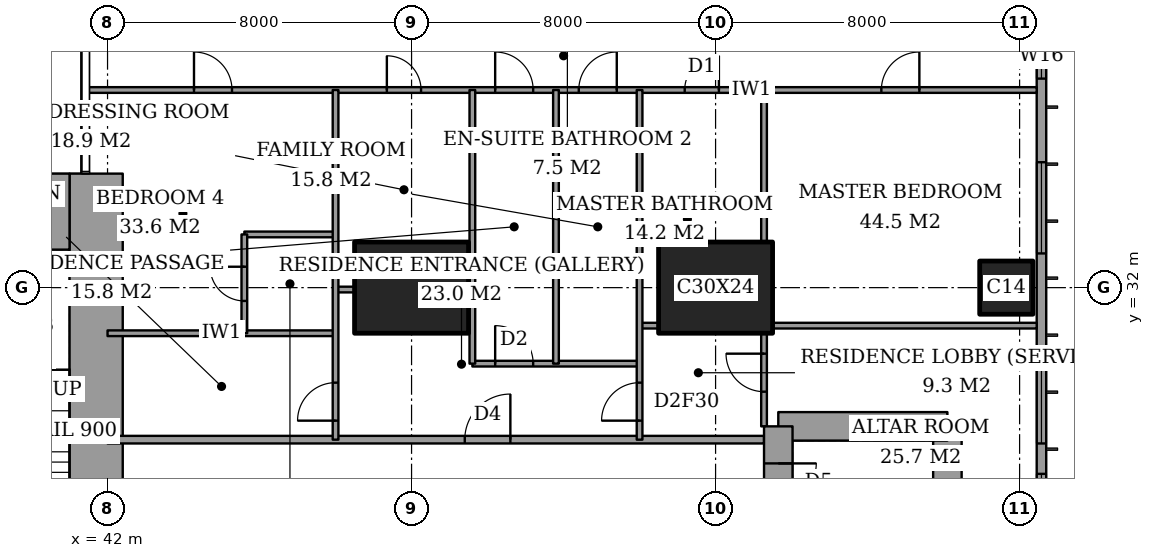
"""IFC4 building model, lengths in metres.
Left out: names, types, materials, properties, quantities, classifications, styles, units other than length and angle.
Written with IfcOpenShell. Run it as: python <this file> out.ifc"""

import sys

from ifc_helpers import new_model, si_unit, direction, frame, frame_2d, origin, origin_2d, place, context, subcontext, project, spatial, rectangle, extrude, element, fill, save


model = new_model("IFC4")
c1 = context("Model", 3, precision=1e-05, world=origin(), true_north=direction((0.0, 1.0)))
c2 = subcontext(c1, "Body", "Model", "MODEL_VIEW")
j1 = project(units=[si_unit("LENGTHUNIT", "METRE"), si_unit("PLANEANGLEUNIT", "RADIAN")], contexts=[c1])
p1 = place(None, origin())
s1 = spatial("IfcSite", under=j1, at=p1, CompositionType="ELEMENT")
p2 = place(p1, origin())
s2 = spatial("IfcBuilding", under=s1, at=p2, CompositionType="ELEMENT")
p3 = place(p2, frame((0.0, 0.0, 282.6)))
s3 = spatial("IfcBuildingStorey", under=s2, at=p3, CompositionType="ELEMENT", Elevation=282.6)
for number, where, z_axis, x_axis in (
    (1, (50.0, 32.0, 0.0), (0.0, 0.0, 1.0), (1.0, 0.0, 0.0)),
    (2, (58.0, 32.0, 0.0), (0.0, 0.0, 1.0), (1.0, 0.0, 0.0)),
):
    element("IfcColumn", number, at=place(p3, frame(where, z_axis=z_axis, x_axis=x_axis)), inside=s3, PredefinedType="COLUMN", context=c2, shape_type="SweptSolid", body=[
        extrude(rectangle(XDim=3.0, YDim=2.4, at=origin_2d()), origin(), (0.0, 0.0, 1.0), 4.5),
    ])
p4 = place(p3, frame((65.65, 32.0, 0.0), z_axis=(0.0, 0.0, 1.0), x_axis=(1.0, 0.0, 0.0)))
e3 = element("IfcColumn", 3, at=p4, inside=s3, PredefinedType="COLUMN", context=c2, shape_type="SweptSolid", body=[
    extrude(rectangle(XDim=1.4, YDim=1.4, at=origin_2d()), origin(), (0.0, 0.0, 1.0), 4.5),
])
p5 = place(p3, frame((37.85, 34.0, 0.0), z_axis=(0.0, 0.0, 1.0), x_axis=(1.0, 0.0, 0.0)))
e4 = element("IfcWall", 4, at=p5, inside=s3, PredefinedType="SHEAR", context=c2, shape_type="SweptSolid", body=[
    extrude(rectangle(XDim=3.15, YDim=2.0, at=frame_2d((1.575, 0.0))), origin(), (0.0, 0.0, 1.0), 4.5),
])
p6 = place(p3, frame((41.7, 24.85, 0.0), z_axis=(0.0, 0.0, 1.0), x_axis=(0.0, 1.0, 0.0)))
e5 = element("IfcWall", 5, at=p6, inside=s3, PredefinedType="SHEAR", context=c2, shape_type="SweptSolid", body=[
    extrude(rectangle(XDim=10.15, YDim=1.4, at=frame_2d((5.075, 0.0))), origin(), (0.0, 0.0, 1.0), 4.5),
])
p7 = place(p3, frame((64.1, 19.65, 0.0), z_axis=(0.0, 0.0, 1.0), x_axis=(0.0, 1.0, 0.0)))
e6 = element("IfcWall", 6, at=p7, inside=s3, PredefinedType="SHEAR", context=c2, shape_type="SweptSolid", body=[
    extrude(rectangle(XDim=8.7, YDim=0.75, at=frame_2d((4.35, 0.0))), origin(), (0.0, 0.0, 1.0), 4.5),
])
p8 = place(p3, frame((64.1, 28.35, 0.0), z_axis=(0.0, 0.0, 1.0), x_axis=(-1.0, 0.0, 0.0)))
e7 = element("IfcWall", 7, at=p8, inside=s3, PredefinedType="SHEAR", context=c2, shape_type="SweptSolid", body=[
    extrude(rectangle(XDim=4.45, YDim=0.75, at=frame_2d((2.225, 0.0))), origin(), (0.0, 0.0, 1.0), 4.5),
])
p9 = place(p3, frame((59.65, 28.35, 0.0), z_axis=(0.0, 0.0, 1.0), x_axis=(0.0, -1.0, 0.0)))
e8 = element("IfcWall", 8, at=p9, inside=s3, PredefinedType="SHEAR", context=c2, shape_type="SweptSolid", body=[
    extrude(rectangle(XDim=8.7, YDim=0.75, at=frame_2d((4.35, 0.0))), origin(), (0.0, 0.0, 1.0), 4.5),
])
p10 = place(p9, frame((0.975, 0.0, 0.0)))
e9 = element("IfcOpeningElement", 9, at=p10, cuts=e8, PredefinedType="OPENING", context=c2, shape_type="SweptSolid", body=[
    extrude(rectangle(XDim=1.0, YDim=2.1, at=frame_2d((0.5, 1.05))), frame((0.0, 0.385, 0.0), z_axis=(0.0, -1.0, 0.0), x_axis=(1.0, 0.0, 0.0)), (0.0, 0.0, 1.0), 0.77),
])
p11 = place(p3, frame((66.575, 3.175, 0.0), z_axis=(0.0, 0.0, 1.0), x_axis=(0.0, 1.0, 0.0)))
e10 = element("IfcWall", 10, at=p11, inside=s3, PredefinedType="SOLIDWALL", context=c2, shape_type="SweptSolid", body=[
    extrude(rectangle(XDim=41.65, YDim=0.25, at=frame_2d((20.825, 0.0))), origin(), (0.0, 0.0, 1.0), 4.5),
])
p12 = place(p11, frame((1.775, 0.0, 0.6)))
e11 = element("IfcOpeningElement", 11, at=p12, cuts=e10, PredefinedType="OPENING", context=c2, shape_type="SweptSolid", body=[
    extrude(rectangle(XDim=2.4, YDim=2.8, at=frame_2d((1.2, 1.4))), frame((0.0, 0.135, 0.0), z_axis=(0.0, -1.0, 0.0), x_axis=(1.0, 0.0, 0.0)), (0.0, 0.0, 1.0), 0.27),
])
p13 = place(p11, frame((6.225, 0.0, 0.6)))
e12 = element("IfcOpeningElement", 12, at=p13, cuts=e10, PredefinedType="OPENING", context=c2, shape_type="SweptSolid", body=[
    extrude(rectangle(XDim=1.2, YDim=2.8, at=frame_2d((0.6, 1.4))), frame((0.0, 0.135, 0.0), z_axis=(0.0, -1.0, 0.0), x_axis=(1.0, 0.0, 0.0)), (0.0, 0.0, 1.0), 0.27),
])
p14 = place(p11, frame((9.625, 0.0, 0.6)))
e13 = element("IfcOpeningElement", 13, at=p14, cuts=e10, PredefinedType="OPENING", context=c2, shape_type="SweptSolid", body=[
    extrude(rectangle(XDim=2.4, YDim=2.8, at=frame_2d((1.2, 1.4))), frame((0.0, 0.135, 0.0), z_axis=(0.0, -1.0, 0.0), x_axis=(1.0, 0.0, 0.0)), (0.0, 0.0, 1.0), 0.27),
])
p15 = place(p11, frame((14.525, 0.0, 0.6)))
e14 = element("IfcOpeningElement", 14, at=p15, cuts=e10, PredefinedType="OPENING", context=c2, shape_type="SweptSolid", body=[
    extrude(rectangle(XDim=2.4, YDim=2.8, at=frame_2d((1.2, 1.4))), frame((0.0, 0.135, 0.0), z_axis=(0.0, -1.0, 0.0), x_axis=(1.0, 0.0, 0.0)), (0.0, 0.0, 1.0), 0.27),
])
p16 = place(p11, frame((17.725, 0.0, 0.6)))
e15 = element("IfcOpeningElement", 15, at=p16, cuts=e10, PredefinedType="OPENING", context=c2, shape_type="SweptSolid", body=[
    extrude(rectangle(XDim=2.4, YDim=2.8, at=frame_2d((1.2, 1.4))), frame((0.0, 0.135, 0.0), z_axis=(0.0, -1.0, 0.0), x_axis=(1.0, 0.0, 0.0)), (0.0, 0.0, 1.0), 0.27),
])
p17 = place(p11, frame((21.525, 0.0, 0.6)))
e16 = element("IfcOpeningElement", 16, at=p17, cuts=e10, PredefinedType="OPENING", context=c2, shape_type="SweptSolid", body=[
    extrude(rectangle(XDim=2.4, YDim=2.8, at=frame_2d((1.2, 1.4))), frame((0.0, 0.135, 0.0), z_axis=(0.0, -1.0, 0.0), x_axis=(1.0, 0.0, 0.0)), (0.0, 0.0, 1.0), 0.27),
])
p18 = place(p11, frame((24.725, 0.0, 0.6)))
e17 = element("IfcOpeningElement", 17, at=p18, cuts=e10, PredefinedType="OPENING", context=c2, shape_type="SweptSolid", body=[
    extrude(rectangle(XDim=2.4, YDim=2.8, at=frame_2d((1.2, 1.4))), frame((0.0, 0.135, 0.0), z_axis=(0.0, -1.0, 0.0), x_axis=(1.0, 0.0, 0.0)), (0.0, 0.0, 1.0), 0.27),
])
p19 = place(p11, frame((29.725, 0.0, 0.6)))
e18 = element("IfcOpeningElement", 18, at=p19, cuts=e10, PredefinedType="OPENING", context=c2, shape_type="SweptSolid", body=[
    extrude(rectangle(XDim=2.4, YDim=2.8, at=frame_2d((1.2, 1.4))), frame((0.0, 0.135, 0.0), z_axis=(0.0, -1.0, 0.0), x_axis=(1.0, 0.0, 0.0)), (0.0, 0.0, 1.0), 0.27),
])
p20 = place(p11, frame((34.325, 0.0, 0.6)))
e19 = element("IfcOpeningElement", 19, at=p20, cuts=e10, PredefinedType="OPENING", context=c2, shape_type="SweptSolid", body=[
    extrude(rectangle(XDim=1.2, YDim=2.8, at=frame_2d((0.6, 1.4))), frame((0.0, 0.135, 0.0), z_axis=(0.0, -1.0, 0.0), x_axis=(1.0, 0.0, 0.0)), (0.0, 0.0, 1.0), 0.27),
])
p21 = place(p11, frame((37.475, 0.0, 0.6)))
e20 = element("IfcOpeningElement", 20, at=p21, cuts=e10, PredefinedType="OPENING", context=c2, shape_type="SweptSolid", body=[
    extrude(rectangle(XDim=2.4, YDim=2.8, at=frame_2d((1.2, 1.4))), frame((0.0, 0.135, 0.0), z_axis=(0.0, -1.0, 0.0), x_axis=(1.0, 0.0, 0.0)), (0.0, 0.0, 1.0), 0.27),
])
p22 = place(p3, frame((42.0, 28.0, 0.0), z_axis=(0.0, 0.0, 1.0), x_axis=(1.0, 0.0, 0.0)))
e21 = element("IfcWall", 21, at=p22, inside=s3, PredefinedType="PARTITIONING", context=c2, shape_type="SweptSolid", body=[
    extrude(rectangle(XDim=17.275, YDim=0.2, at=frame_2d((8.637, 0.0))), origin(), (0.0, 0.0, 1.0), 4.25),
])
p23 = place(p22, frame((9.4, 0.0, 0.0)))
e22 = element("IfcOpeningElement", 22, at=p23, cuts=e21, PredefinedType="OPENING", context=c2, shape_type="SweptSolid", body=[
    extrude(rectangle(XDim=1.2, YDim=2.4, at=frame_2d((0.6, 1.2))), frame((0.0, 0.11, 0.0), z_axis=(0.0, -1.0, 0.0), x_axis=(1.0, 0.0, 0.0)), (0.0, 0.0, 1.0), 0.22),
])
p24 = place(p3, frame((51.6, 30.0, 0.0), z_axis=(0.0, 0.0, 1.0), x_axis=(1.0, 0.0, 0.0)))
e23 = element("IfcWall", 23, at=p24, inside=s3, PredefinedType="PARTITIONING", context=c2, shape_type="SweptSolid", body=[
    extrude(rectangle(XDim=4.4, YDim=0.15, at=frame_2d((2.2, 0.0))), origin(), (0.0, 0.0, 1.0), 4.25),
])
p25 = place(p24, frame((0.6, 0.0, 0.0)))
e24 = element("IfcOpeningElement", 24, at=p25, cuts=e23, PredefinedType="OPENING", context=c2, shape_type="SweptSolid", body=[
    extrude(rectangle(XDim=1.0, YDim=2.1, at=frame_2d((0.5, 1.05))), frame((0.0, 0.085, 0.0), z_axis=(0.0, -1.0, 0.0), x_axis=(1.0, 0.0, 0.0)), (0.0, 0.0, 1.0), 0.17),
])
p26 = place(p3, frame((42.0, 30.8, 0.0), z_axis=(0.0, 0.0, 1.0), x_axis=(1.0, 0.0, 0.0)))
e25 = element("IfcWall", 25, at=p26, inside=s3, PredefinedType="PARTITIONING", context=c2, shape_type="SweptSolid", body=[
    extrude(rectangle(XDim=6.0, YDim=0.15, at=frame_2d((3.0, 0.0))), origin(), (0.0, 0.0, 1.0), 4.25),
])
p27 = place(p3, frame((56.0, 31.0, 0.0), z_axis=(0.0, 0.0, 1.0), x_axis=(1.0, 0.0, 0.0)))
e26 = element("IfcWall", 26, at=p27, inside=s3, PredefinedType="PARTITIONING", context=c2, shape_type="SweptSolid", body=[
    extrude(rectangle(XDim=0.5, YDim=0.15, at=frame_2d((0.25, 0.0))), origin(), (0.0, 0.0, 1.0), 4.25),
])
p28 = place(p3, frame((59.5, 31.0, 0.0), z_axis=(0.0, 0.0, 1.0), x_axis=(1.0, 0.0, 0.0)))
e27 = element("IfcWall", 27, at=p28, inside=s3, PredefinedType="PARTITIONING", context=c2, shape_type="SweptSolid", body=[
    extrude(rectangle(XDim=6.95, YDim=0.15, at=frame_2d((3.475, 0.0))), origin(), (0.0, 0.0, 1.0), 4.25),
])
p29 = place(p3, frame((48.0, 31.95, 0.0), z_axis=(0.0, 0.0, 1.0), x_axis=(1.0, 0.0, 0.0)))
e28 = element("IfcWall", 28, at=p29, inside=s3, PredefinedType="PARTITIONING", context=c2, shape_type="SweptSolid", body=[
    extrude(rectangle(XDim=0.5, YDim=0.15, at=frame_2d((0.25, 0.0))), origin(), (0.0, 0.0, 1.0), 3.534),
])
p30 = place(p3, frame((45.6, 33.4, 0.0), z_axis=(0.0, 0.0, 1.0), x_axis=(1.0, 0.0, 0.0)))
e29 = element("IfcWall", 29, at=p30, inside=s3, PredefinedType="PARTITIONING", context=c2, shape_type="SweptSolid", body=[
    extrude(rectangle(XDim=2.4, YDim=0.15, at=frame_2d((1.2, 0.0))), origin(), (0.0, 0.0, 1.0), 4.25),
])
p31 = place(p3, frame((41.439, 37.2, 0.0), z_axis=(0.0, 0.0, 1.0), x_axis=(1.0, 0.0, 0.0)))
e30 = element("IfcWall", 30, at=p31, inside=s3, PredefinedType="PARTITIONING", context=c2, shape_type="SweptSolid", body=[
    extrude(rectangle(XDim=25.011, YDim=0.15, at=frame_2d((12.505, 0.0))), origin(), (0.0, 0.0, 1.0), 4.25),
])
p32 = place(p31, frame((10.761, 0.0, 0.0)))
e31 = element("IfcOpeningElement", 31, at=p32, cuts=e30, PredefinedType="OPENING", context=c2, shape_type="SweptSolid", body=[
    extrude(rectangle(XDim=1.0, YDim=2.1, at=frame_2d((0.5, 1.05))), frame((0.0, 0.085, 0.0), z_axis=(0.0, -1.0, 0.0), x_axis=(1.0, 0.0, 0.0)), (0.0, 0.0, 1.0), 0.17),
])
p33 = place(p31, frame((20.924, 0.0, 0.0)))
e32 = element("IfcOpeningElement", 32, at=p33, cuts=e30, PredefinedType="OPENING", context=c2, shape_type="SweptSolid", body=[
    extrude(rectangle(XDim=1.0, YDim=2.1, at=frame_2d((0.5, 1.05))), frame((0.0, 0.085, 0.0), z_axis=(0.0, -1.0, 0.0), x_axis=(1.0, 0.0, 0.0)), (0.0, 0.0, 1.0), 0.17),
])
p34 = place(p31, frame((15.749, 0.0, 0.0)))
e33 = element("IfcOpeningElement", 33, at=p34, cuts=e30, PredefinedType="OPENING", context=c2, shape_type="SweptSolid", body=[
    extrude(rectangle(XDim=0.9, YDim=2.1, at=frame_2d((0.45, 1.05))), frame((0.0, 0.085, 0.0), z_axis=(0.0, -1.0, 0.0), x_axis=(1.0, 0.0, 0.0)), (0.0, 0.0, 1.0), 0.17),
])
p35 = place(p31, frame((12.961, 0.0, 0.0)))
e34 = element("IfcOpeningElement", 34, at=p35, cuts=e30, PredefinedType="OPENING", context=c2, shape_type="SweptSolid", body=[
    extrude(rectangle(XDim=1.0, YDim=2.1, at=frame_2d((0.5, 1.05))), frame((0.0, 0.085, 0.0), z_axis=(0.0, -1.0, 0.0), x_axis=(1.0, 0.0, 0.0)), (0.0, 0.0, 1.0), 0.17),
])
p36 = place(p31, frame((7.911, 0.0, 0.0)))
e35 = element("IfcOpeningElement", 35, at=p36, cuts=e30, PredefinedType="OPENING", context=c2, shape_type="SweptSolid", body=[
    extrude(rectangle(XDim=0.9, YDim=2.1, at=frame_2d((0.45, 1.05))), frame((0.0, 0.085, 0.0), z_axis=(0.0, -1.0, 0.0), x_axis=(1.0, 0.0, 0.0)), (0.0, 0.0, 1.0), 0.17),
])
p37 = place(p31, frame((2.836, 0.0, 0.0)))
e36 = element("IfcOpeningElement", 36, at=p37, cuts=e30, PredefinedType="OPENING", context=c2, shape_type="SweptSolid", body=[
    extrude(rectangle(XDim=1.0, YDim=2.1, at=frame_2d((0.5, 1.05))), frame((0.0, 0.085, 0.0), z_axis=(0.0, -1.0, 0.0), x_axis=(1.0, 0.0, 0.0)), (0.0, 0.0, 1.0), 0.17),
])
p38 = place(p3, frame((45.6, 30.8, 0.0), z_axis=(0.0, 0.0, 1.0), x_axis=(0.0, 1.0, 0.0)))
e37 = element("IfcWall", 37, at=p38, inside=s3, PredefinedType="PARTITIONING", context=c2, shape_type="SweptSolid", body=[
    extrude(rectangle(XDim=2.6, YDim=0.15, at=frame_2d((1.3, 0.0))), origin(), (0.0, 0.0, 1.0), 4.25),
])
p39 = place(p38, frame((0.85, 0.0, 0.0)))
e38 = element("IfcOpeningElement", 38, at=p39, cuts=e37, PredefinedType="OPENING", context=c2, shape_type="SweptSolid", body=[
    extrude(rectangle(XDim=0.9, YDim=2.1, at=frame_2d((0.45, 1.05))), frame((0.0, 0.085, 0.0), z_axis=(0.0, -1.0, 0.0), x_axis=(1.0, 0.0, 0.0)), (0.0, 0.0, 1.0), 0.17),
])
p40 = place(p3, frame((48.0, 28.0, 0.0), z_axis=(0.0, 0.0, 1.0), x_axis=(0.0, 1.0, 0.0)))
e39 = element("IfcWall", 39, at=p40, inside=s3, PredefinedType="PARTITIONING", context=c2, shape_type="SweptSolid", body=[
    extrude(rectangle(XDim=9.2, YDim=0.15, at=frame_2d((4.6, 0.0))), origin(), (0.0, 0.0, 1.0), 4.25),
])
p41 = place(p40, frame((0.5, 0.0, 0.0)))
e40 = element("IfcOpeningElement", 40, at=p41, cuts=e39, PredefinedType="OPENING", context=c2, shape_type="SweptSolid", body=[
    extrude(rectangle(XDim=1.0, YDim=2.1, at=frame_2d((0.5, 1.05))), frame((0.0, 0.085, 0.0), z_axis=(0.0, -1.0, 0.0), x_axis=(1.0, 0.0, 0.0)), (0.0, 0.0, 1.0), 0.17),
])
for number, where, z_axis, x_axis in (
    (41, (51.6, 30.0, 0.0), (0.0, 0.0, 1.0), (0.0, 1.0, 0.0)),
    (42, (53.8, 30.0, 0.0), (0.0, 0.0, 1.0), (0.0, 1.0, 0.0)),
):
    element("IfcWall", number, at=place(p3, frame(where, z_axis=z_axis, x_axis=x_axis)), inside=s3, PredefinedType="PARTITIONING", context=c2, shape_type="SweptSolid", body=[
        extrude(rectangle(XDim=7.2, YDim=0.15, at=frame_2d((3.6, 0.0))), origin(), (0.0, 0.0, 1.0), 4.25),
    ])
p42 = place(p3, frame((56.0, 28.0, 0.0), z_axis=(0.0, 0.0, 1.0), x_axis=(0.0, 1.0, 0.0)))
e43 = element("IfcWall", 43, at=p42, inside=s3, PredefinedType="PARTITIONING", context=c2, shape_type="SweptSolid", body=[
    extrude(rectangle(XDim=9.2, YDim=0.15, at=frame_2d((4.6, 0.0))), origin(), (0.0, 0.0, 1.0), 4.25),
])
p43 = place(p42, frame((0.5, 0.0, 0.0)))
e44 = element("IfcOpeningElement", 44, at=p43, cuts=e43, PredefinedType="OPENING", context=c2, shape_type="SweptSolid", body=[
    extrude(rectangle(XDim=1.0, YDim=2.1, at=frame_2d((0.5, 1.05))), frame((0.0, 0.085, 0.0), z_axis=(0.0, -1.0, 0.0), x_axis=(1.0, 0.0, 0.0)), (0.0, 0.0, 1.0), 0.17),
])
p44 = place(p3, frame((59.275, 28.35, 0.0), z_axis=(0.0, 0.0, 1.0), x_axis=(0.0, 1.0, 0.0)))
e45 = element("IfcWall", 45, at=p44, inside=s3, PredefinedType="PARTITIONING", context=c2, shape_type="SweptSolid", body=[
    extrude(rectangle(XDim=2.45, YDim=0.15, at=frame_2d((1.225, 0.0))), origin(), (0.0, 0.0, 1.0), 4.25),
])
p45 = place(p44, frame((0.913, 0.0, 0.0)))
e46 = element("IfcOpeningElement", 46, at=p45, cuts=e45, PredefinedType="OPENING", context=c2, shape_type="SweptSolid", body=[
    extrude(rectangle(XDim=1.0, YDim=2.1, at=frame_2d((0.5, 1.05))), frame((0.0, 0.085, 0.0), z_axis=(0.0, -1.0, 0.0), x_axis=(1.0, 0.0, 0.0)), (0.0, 0.0, 1.0), 0.17),
])
p46 = place(p3, frame((59.275, 33.2, 0.0), z_axis=(0.0, 0.0, 1.0), x_axis=(0.0, 1.0, 0.0)))
e47 = element("IfcWall", 47, at=p46, inside=s3, PredefinedType="PARTITIONING", context=c2, shape_type="SweptSolid", body=[
    extrude(rectangle(XDim=4.0, YDim=0.15, at=frame_2d((2.0, 0.0))), origin(), (0.0, 0.0, 1.0), 4.25),
])
p47 = place(p17, origin())
e48 = element("IfcWindow", 48, at=p47, inside=s3, PartitioningType="SINGLE_PANEL", PredefinedType="WINDOW", context=c2, shape_type="SweptSolid", body=[
    extrude(rectangle(XDim=2.4, YDim=2.8, at=frame_2d((1.2, 1.4))), frame((0.0, 0.03, 0.0), z_axis=(0.0, -1.0, 0.0), x_axis=(1.0, 0.0, 0.0)), (0.0, 0.0, 1.0), 0.06),
])
fill(e16, e48)
p48 = place(p18, origin())
e49 = element("IfcWindow", 49, at=p48, inside=s3, PartitioningType="SINGLE_PANEL", PredefinedType="WINDOW", context=c2, shape_type="SweptSolid", body=[
    extrude(rectangle(XDim=2.4, YDim=2.8, at=frame_2d((1.2, 1.4))), frame((0.0, 0.03, 0.0), z_axis=(0.0, -1.0, 0.0), x_axis=(1.0, 0.0, 0.0)), (0.0, 0.0, 1.0), 0.06),
])
fill(e17, e49)
p49 = place(p19, origin())
e50 = element("IfcWindow", 50, at=p49, inside=s3, PartitioningType="SINGLE_PANEL", PredefinedType="WINDOW", context=c2, shape_type="SweptSolid", body=[
    extrude(rectangle(XDim=2.4, YDim=2.8, at=frame_2d((1.2, 1.4))), frame((0.0, 0.03, 0.0), z_axis=(0.0, -1.0, 0.0), x_axis=(1.0, 0.0, 0.0)), (0.0, 0.0, 1.0), 0.06),
])
fill(e18, e50)
p50 = place(p20, origin())
e51 = element("IfcWindow", 51, at=p50, inside=s3, PartitioningType="SINGLE_PANEL", PredefinedType="WINDOW", context=c2, shape_type="SweptSolid", body=[
    extrude(rectangle(XDim=1.2, YDim=2.8, at=frame_2d((0.6, 1.4))), frame((0.0, 0.03, 0.0), z_axis=(0.0, -1.0, 0.0), x_axis=(1.0, 0.0, 0.0)), (0.0, 0.0, 1.0), 0.06),
])
fill(e19, e51)
p51 = place(p32, origin())
e52 = element("IfcDoor", 52, at=p51, inside=s3, OperationType="SINGLE_SWING_RIGHT", PredefinedType="DOOR", context=c2, shape_type="SweptSolid", body=[
    extrude(rectangle(XDim=1.0, YDim=2.1, at=frame_2d((0.5, 1.05))), frame((0.0, 0.025, 0.0), z_axis=(0.0, -1.0, 0.0), x_axis=(1.0, 0.0, 0.0)), (0.0, 0.0, 1.0), 0.05),
])
fill(e31, e52)
p52 = place(p33, origin())
e53 = element("IfcDoor", 53, at=p52, inside=s3, OperationType="SINGLE_SWING_LEFT", PredefinedType="DOOR", context=c2, shape_type="SweptSolid", body=[
    extrude(rectangle(XDim=1.0, YDim=2.1, at=frame_2d((0.5, 1.05))), frame((0.0, 0.025, 0.0), z_axis=(0.0, -1.0, 0.0), x_axis=(1.0, 0.0, 0.0)), (0.0, 0.0, 1.0), 0.05),
])
fill(e32, e53)
p53 = place(p45, origin())
e54 = element("IfcDoor", 54, at=p53, inside=s3, OperationType="SINGLE_SWING_LEFT", PredefinedType="DOOR", context=c2, shape_type="SweptSolid", body=[
    extrude(rectangle(XDim=1.0, YDim=2.1, at=frame_2d((0.5, 1.05))), frame((0.0, 0.025, 0.0), z_axis=(0.0, -1.0, 0.0), x_axis=(1.0, 0.0, 0.0)), (0.0, 0.0, 1.0), 0.05),
])
fill(e46, e54)
p54 = place(p34, origin())
e55 = element("IfcDoor", 55, at=p54, inside=s3, OperationType="SINGLE_SWING_LEFT", PredefinedType="DOOR", context=c2, shape_type="SweptSolid", body=[
    extrude(rectangle(XDim=0.9, YDim=2.1, at=frame_2d((0.45, 1.05))), frame((0.0, 0.025, 0.0), z_axis=(0.0, -1.0, 0.0), x_axis=(1.0, 0.0, 0.0)), (0.0, 0.0, 1.0), 0.05),
])
fill(e33, e55)
p55 = place(p43, origin())
e56 = element("IfcDoor", 56, at=p55, inside=s3, OperationType="SINGLE_SWING_RIGHT", PredefinedType="DOOR", context=c2, shape_type="SweptSolid", body=[
    extrude(rectangle(XDim=1.0, YDim=2.1, at=frame_2d((0.5, 1.05))), frame((0.0, 0.025, 0.0), z_axis=(0.0, -1.0, 0.0), x_axis=(1.0, 0.0, 0.0)), (0.0, 0.0, 1.0), 0.05),
])
fill(e44, e56)
p56 = place(p23, origin())
e57 = element("IfcDoor", 57, at=p56, inside=s3, OperationType="SINGLE_SWING_LEFT", PredefinedType="DOOR", context=c2, shape_type="SweptSolid", body=[
    extrude(rectangle(XDim=1.2, YDim=2.4, at=frame_2d((0.6, 1.2))), frame((0.0, 0.025, 0.0), z_axis=(0.0, -1.0, 0.0), x_axis=(1.0, 0.0, 0.0)), (0.0, 0.0, 1.0), 0.05),
])
fill(e22, e57)
p57 = place(p35, origin())
e58 = element("IfcDoor", 58, at=p57, inside=s3, OperationType="SINGLE_SWING_LEFT", PredefinedType="DOOR", context=c2, shape_type="SweptSolid", body=[
    extrude(rectangle(XDim=1.0, YDim=2.1, at=frame_2d((0.5, 1.05))), frame((0.0, 0.025, 0.0), z_axis=(0.0, -1.0, 0.0), x_axis=(1.0, 0.0, 0.0)), (0.0, 0.0, 1.0), 0.05),
])
fill(e34, e58)
p58 = place(p25, origin())
e59 = element("IfcDoor", 59, at=p58, inside=s3, OperationType="SINGLE_SWING_RIGHT", PredefinedType="DOOR", context=c2, shape_type="SweptSolid", body=[
    extrude(rectangle(XDim=1.0, YDim=2.1, at=frame_2d((0.5, 1.05))), frame((0.0, 0.025, 0.0), z_axis=(0.0, -1.0, 0.0), x_axis=(1.0, 0.0, 0.0)), (0.0, 0.0, 1.0), 0.05),
])
fill(e24, e59)
p59 = place(p36, origin())
e60 = element("IfcDoor", 60, at=p59, inside=s3, OperationType="SINGLE_SWING_RIGHT", PredefinedType="DOOR", context=c2, shape_type="SweptSolid", body=[
    extrude(rectangle(XDim=0.9, YDim=2.1, at=frame_2d((0.45, 1.05))), frame((0.0, 0.025, 0.0), z_axis=(0.0, -1.0, 0.0), x_axis=(1.0, 0.0, 0.0)), (0.0, 0.0, 1.0), 0.05),
])
fill(e35, e60)
p60 = place(p39, origin())
e61 = element("IfcDoor", 61, at=p60, inside=s3, OperationType="SINGLE_SWING_LEFT", PredefinedType="DOOR", context=c2, shape_type="SweptSolid", body=[
    extrude(rectangle(XDim=0.9, YDim=2.1, at=frame_2d((0.45, 1.05))), frame((0.0, 0.025, 0.0), z_axis=(0.0, -1.0, 0.0), x_axis=(1.0, 0.0, 0.0)), (0.0, 0.0, 1.0), 0.05),
])
fill(e38, e61)
p61 = place(p37, origin())
e62 = element("IfcDoor", 62, at=p61, inside=s3, OperationType="SINGLE_SWING_RIGHT", PredefinedType="DOOR", context=c2, shape_type="SweptSolid", body=[
    extrude(rectangle(XDim=1.0, YDim=2.1, at=frame_2d((0.5, 1.05))), frame((0.0, 0.025, 0.0), z_axis=(0.0, -1.0, 0.0), x_axis=(1.0, 0.0, 0.0)), (0.0, 0.0, 1.0), 0.05),
])
fill(e36, e62)
p62 = place(p41, origin())
e63 = element("IfcDoor", 63, at=p62, inside=s3, OperationType="SINGLE_SWING_RIGHT", PredefinedType="DOOR", context=c2, shape_type="SweptSolid", body=[
    extrude(rectangle(XDim=1.0, YDim=2.1, at=frame_2d((0.5, 1.05))), frame((0.0, 0.025, 0.0), z_axis=(0.0, -1.0, 0.0), x_axis=(1.0, 0.0, 0.0)), (0.0, 0.0, 1.0), 0.05),
])
fill(e40, e63)
p63 = place(p10, origin())
e64 = element("IfcDoor", 64, at=p63, inside=s3, OperationType="SINGLE_SWING_RIGHT", PredefinedType="DOOR", context=c2, shape_type="SweptSolid", body=[
    extrude(rectangle(XDim=1.0, YDim=2.1, at=frame_2d((0.5, 1.05))), frame((0.0, 0.025, 0.0), z_axis=(0.0, -1.0, 0.0), x_axis=(1.0, 0.0, 0.0)), (0.0, 0.0, 1.0), 0.05),
])
fill(e9, e64)
save(model, sys.argv[1])
